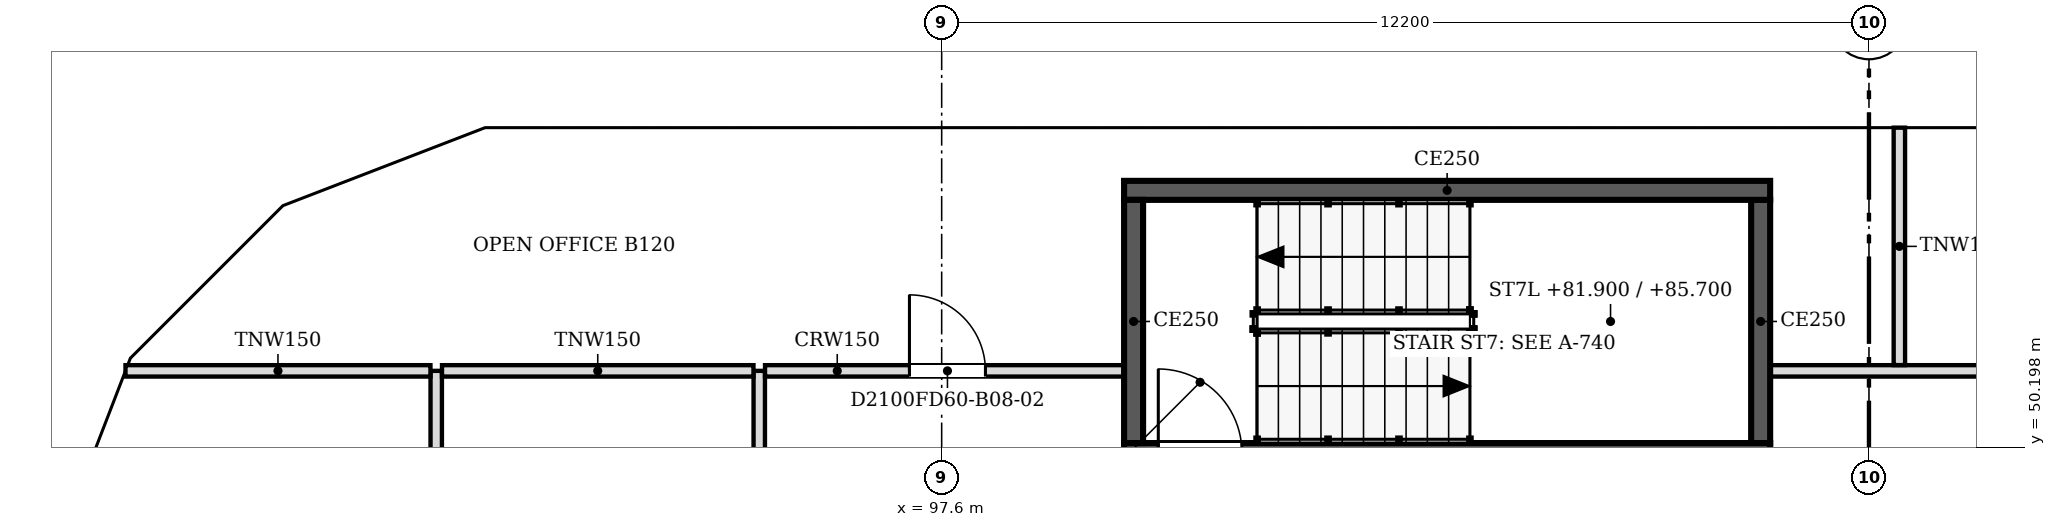
"""IFC4 building model, lengths in metres.
Left out: names, types, materials, properties, quantities, classifications, styles, units other than length and angle.
Written with IfcOpenShell. Run it as: python <this file> out.ifc"""

import sys

from ifc_helpers import new_model, si_unit, direction, frame, frame_2d, origin, place, context, subcontext, project, spatial, polyline, rectangle, outline, extrude, faceted_brep, source, transform, mapped, element, fill, save


model = new_model("IFC4")
c1 = context("Model", 3, precision=1e-05, world=origin(), true_north=direction((0.0, 1.0)))
c2 = subcontext(c1, "Body", "Model", "MODEL_VIEW")
j1 = project(units=[si_unit("LENGTHUNIT", "METRE"), si_unit("PLANEANGLEUNIT", "RADIAN")], contexts=[c1])
p1 = place(None, origin())
s1 = spatial("IfcSite", under=j1, at=p1, CompositionType="ELEMENT")
p2 = place(p1, origin())
s2 = spatial("IfcBuilding", under=s1, at=p2, CompositionType="ELEMENT")
p3 = place(p2, frame((0.0, 0.0, 80.0)))
s3 = spatial("IfcBuildingStorey", under=s2, at=p3, CompositionType="ELEMENT", Elevation=80.0)
m1 = source(origin(), c2, "Body", "Brep", [
    faceted_brep([(3.05, -0.25, 0.0), (6.1, -0.25, 3.8), (6.1, -0.25, 3.8), (3.05, -0.25, 7.6), (0.0, -0.25, 3.8), (0.0, 0.25, 3.8), (3.05, 0.25, 7.6), (6.1, 0.25, 3.8), (6.1, 0.25, 3.8), (3.05, 0.25, 0.0)], [[[0, 1, 2, 3, 4]], [[5, 6, 7, 8, 9]], [[9, 8, 1, 0]], [[7, 6, 3, 2]], [[6, 5, 4, 3]], [[5, 9, 0, 4]], [[1, 8, 7, 2]]]),
])
p4 = place(p3, frame((115.9, 54.65, -3.8), z_axis=(0.0, 0.0, 1.0), x_axis=(-1.0, 0.0, 0.0)))
e1 = element("IfcWall", 1, at=p4, inside=s3, PredefinedType="SOLIDWALL", context=c2, shape_type="MappedRepresentation", body=[
    mapped(m1, transform((0.0, 0.0, 0.0), scale=1.0)),
])
m2 = source(origin(), c2, "Body", "SweptSolid", [
    extrude(outline(polyline([(3.05, 0.399), (5.78, 3.8), (3.05, 7.201), (0.321, 3.8), (3.05, 0.399)])), frame((0.0, 0.26, 0.0), z_axis=(0.0, -1.0, 0.0), x_axis=(1.0, 0.0, 0.0)), (0.0, 0.0, 1.0), 0.52),
])
p5 = place(p4, origin())
e2 = element("IfcOpeningElement", 2, at=p5, cuts=e1, PredefinedType="OPENING", context=c2, shape_type="MappedRepresentation", body=[
    mapped(m2, transform((0.0, 0.0, 0.0), scale=1.0)),
])
m3 = source(origin(), c2, "Body", "SweptSolid", [
    extrude(outline(polyline([(3.05, 0.0), (6.1, 3.8), (3.05, 7.6), (0.0, 3.8), (3.05, 0.0)])), frame((0.0, 0.25, 0.0), z_axis=(0.0, -1.0, 0.0), x_axis=(1.0, 0.0, 0.0)), (0.0, 0.0, 1.0), 0.5),
])
p6 = place(p3, frame((109.8, 54.65, -3.8), z_axis=(0.0, 0.0, 1.0), x_axis=(-1.0, 0.0, 0.0)))
e3 = element("IfcWall", 3, at=p6, inside=s3, PredefinedType="SOLIDWALL", context=c2, shape_type="MappedRepresentation", body=[
    mapped(m3, transform((0.0, 0.0, 0.0), scale=1.0)),
])
p7 = place(p6, origin())
e4 = element("IfcOpeningElement", 4, at=p7, cuts=e3, PredefinedType="OPENING", context=c2, shape_type="MappedRepresentation", body=[
    mapped(m2, transform((0.0, 0.0, 0.0), scale=1.0)),
])
p8 = place(p3, frame((103.7, 54.65, -3.8), z_axis=(0.0, 0.0, 1.0), x_axis=(-1.0, 0.0, 0.0)))
e5 = element("IfcWall", 5, at=p8, inside=s3, PredefinedType="SOLIDWALL", context=c2, shape_type="MappedRepresentation", body=[
    mapped(m1, transform((0.0, 0.0, 0.0), scale=1.0)),
])
p9 = place(p8, origin())
e6 = element("IfcOpeningElement", 6, at=p9, cuts=e5, PredefinedType="OPENING", context=c2, shape_type="MappedRepresentation", body=[
    mapped(m2, transform((0.0, 0.0, 0.0), scale=1.0)),
])
m4 = source(origin(), c2, "Body", "Brep", [
    faceted_brep([(3.05, -0.25, 0.0), (6.053, -0.25, 3.8), (3.05, -0.25, 7.6), (0.0, -0.25, 3.8), (0.0, 0.25, 3.8), (3.05, 0.25, 7.6), (6.007, 0.25, 3.859), (6.007, 0.25, 3.741), (3.05, 0.25, 0.0), (6.053, 0.0, 3.8)], [[[0, 1, 2, 3]], [[4, 5, 6, 7, 8]], [[8, 7, 9, 1, 0]], [[6, 5, 2, 1, 9]], [[5, 4, 3, 2]], [[4, 8, 0, 3]], [[9, 7, 6]]]),
])
p10 = place(p3, frame((97.6, 54.65, -3.8), z_axis=(0.0, 0.0, 1.0), x_axis=(-1.0, 0.0, 0.0)))
e7 = element("IfcWall", 7, at=p10, inside=s3, PredefinedType="SOLIDWALL", context=c2, shape_type="MappedRepresentation", body=[
    mapped(m4, transform((0.0, 0.0, 0.0), scale=1.0)),
])
m5 = source(origin(), c2, "Body", "SweptSolid", [
    extrude(outline(polyline([(3.049, 0.401), (5.735, 3.8), (3.049, 7.199), (0.321, 3.8), (3.049, 0.401)])), frame((0.0, 0.26, 0.0), z_axis=(0.0, -1.0, 0.0), x_axis=(1.0, 0.0, 0.0)), (0.0, 0.0, 1.0), 0.52),
])
p11 = place(p10, origin())
e8 = element("IfcOpeningElement", 8, at=p11, cuts=e7, PredefinedType="OPENING", context=c2, shape_type="MappedRepresentation", body=[
    mapped(m5, transform((0.0, 0.0, 0.0), scale=1.0)),
])
m6 = source(origin(), c2, "Body", "Brep", [
    faceted_brep([(2.95, -0.25, 0.0), (3.003, -0.25, 0.068), (3.003, -0.25, 7.532), (2.95, -0.25, 7.6), (0.0, -0.25, 3.8), (0.047, 0.25, 3.86), (2.898, 0.25, 7.532), (2.898, 0.25, 0.068), (0.047, 0.25, 3.74), (2.95, 0.0, 0.0), (2.95, 0.0, 7.6), (0.0, 0.0, 3.8)], [[[0, 1, 2, 3, 4]], [[5, 6, 7, 8]], [[1, 0, 9]], [[10, 3, 2]], [[6, 5, 11, 4, 3, 10]], [[8, 7, 9, 0, 4, 11]], [[8, 11, 5]], [[1, 9, 7, 6, 10, 2]]]),
])
p12 = place(p3, frame((91.547, 54.65, -3.8), z_axis=(0.0, 0.0, 1.0), x_axis=(-0.933007896601, -0.359855894603, 0.0)))
e9 = element("IfcWall", 9, at=p12, inside=s3, PredefinedType="SOLIDWALL", context=c2, shape_type="MappedRepresentation", body=[
    mapped(m6, transform((0.0, 0.0, 0.0), scale=1.0)),
])
m7 = source(origin(), c2, "Body", "SweptSolid", [
    extrude(outline(polyline([(2.75, 6.935), (0.316, 3.8), (2.75, 0.665), (2.75, 6.935)])), frame((0.0, 0.26, 0.0), z_axis=(0.0, -1.0, 0.0), x_axis=(1.0, 0.0, 0.0)), (0.0, 0.0, 1.0), 0.52),
])
p13 = place(p12, origin())
e10 = element("IfcOpeningElement", 10, at=p13, cuts=e9, PredefinedType="OPENING", context=c2, shape_type="MappedRepresentation", body=[
    mapped(m7, transform((0.0, 0.0, 0.0), scale=1.0)),
])
m8 = source(origin(), c2, "Body", "Brep", [
    faceted_brep([(0.053, -0.25, 0.0), (2.997, -0.25, 3.8), (0.053, -0.25, 7.6), (0.0, -0.25, 7.532), (0.0, -0.25, 0.068), (0.106, 0.25, 7.532), (2.944, 0.25, 3.868), (2.944, 0.25, 3.732), (0.106, 0.25, 0.068), (2.997, 0.0, 3.8), (0.053, 0.0, 0.0), (0.053, 0.0, 7.6)], [[[0, 1, 2, 3, 4]], [[5, 6, 7, 8]], [[8, 7, 9, 1, 0, 10]], [[6, 5, 11, 2, 1, 9]], [[3, 2, 11]], [[10, 0, 4]], [[8, 10, 4, 3, 11, 5]], [[9, 7, 6]]]),
])
p14 = place(p3, frame((88.831, 53.625, -3.8), z_axis=(0.0, 0.0, 1.0), x_axis=(-0.707147509625, -0.707066050402, 0.0)))
e11 = element("IfcWall", 11, at=p14, inside=s3, PredefinedType="SOLIDWALL", context=c2, shape_type="MappedRepresentation", body=[
    mapped(m8, transform((0.0, 0.0, 0.0), scale=1.0)),
])
m9 = source(origin(), c2, "Body", "SweptSolid", [
    extrude(outline(polyline([(0.253, 0.666), (2.681, 3.8), (0.253, 6.934), (0.253, 0.666)])), frame((0.0, 0.26, 0.0), z_axis=(0.0, -1.0, 0.0), x_axis=(1.0, 0.0, 0.0)), (0.0, 0.0, 1.0), 0.52),
])
p15 = place(p14, origin())
e12 = element("IfcOpeningElement", 12, at=p15, cuts=e11, PredefinedType="OPENING", context=c2, shape_type="MappedRepresentation", body=[
    mapped(m9, transform((0.0, 0.0, 0.0), scale=1.0)),
])
m10 = source(origin(), c2, "Body", "Brep", [
    faceted_brep([(2.95, -0.25, 0.0), (2.997, -0.25, 0.059), (2.997, -0.25, 7.541), (2.95, -0.25, 7.6), (0.0, -0.25, 3.8), (0.053, 0.25, 3.868), (2.904, 0.25, 7.54), (2.904, 0.25, 0.06), (0.053, 0.25, 3.732), (2.95, 0.0, 0.0), (2.95, 0.0, 7.6), (0.0, 0.0, 3.8)], [[[0, 1, 2, 3, 4]], [[5, 6, 7, 8]], [[1, 0, 9]], [[10, 3, 2]], [[6, 5, 11, 4, 3, 10]], [[8, 7, 9, 0, 4, 11]], [[8, 11, 5]], [[1, 9, 7, 6, 10, 2]]]),
])
p16 = place(p3, frame((86.712, 51.506, -3.8), z_axis=(0.0, 0.0, 1.0), x_axis=(-0.359874094142, -0.933000876937, 0.0)))
e13 = element("IfcWall", 13, at=p16, inside=s3, PredefinedType="SOLIDWALL", context=c2, shape_type="MappedRepresentation", body=[
    mapped(m10, transform((0.0, 0.0, 0.0), scale=1.0)),
])
p17 = place(p16, origin())
e14 = element("IfcOpeningElement", 14, at=p17, cuts=e13, PredefinedType="OPENING", context=c2, shape_type="MappedRepresentation", body=[
    mapped(m7, transform((0.0, 0.0, 0.0), scale=1.0)),
])
p18 = place(p2, frame((0.0, 0.0, 83.8)))
s4 = spatial("IfcBuildingStorey", under=s2, at=p18, CompositionType="ELEMENT", Elevation=83.8)
p19 = place(p18, frame((112.85, 54.65, -3.8), z_axis=(0.0, 0.0, 1.0), x_axis=(-1.0, 0.0, 0.0)))
e15 = element("IfcWall", 15, at=p19, inside=s4, PredefinedType="SOLIDWALL", context=c2, shape_type="MappedRepresentation", body=[
    mapped(m3, transform((0.0, 0.0, 0.0), scale=1.0)),
])
p20 = place(p19, origin())
e16 = element("IfcOpeningElement", 16, at=p20, cuts=e15, PredefinedType="OPENING", context=c2, shape_type="MappedRepresentation", body=[
    mapped(m2, transform((0.0, 0.0, 0.0), scale=1.0)),
])
p21 = place(p18, frame((106.75, 54.65, -3.8), z_axis=(0.0, 0.0, 1.0), x_axis=(-1.0, 0.0, 0.0)))
e17 = element("IfcWall", 17, at=p21, inside=s4, PredefinedType="SOLIDWALL", context=c2, shape_type="MappedRepresentation", body=[
    mapped(m3, transform((0.0, 0.0, 0.0), scale=1.0)),
])
p22 = place(p21, origin())
e18 = element("IfcOpeningElement", 18, at=p22, cuts=e17, PredefinedType="OPENING", context=c2, shape_type="MappedRepresentation", body=[
    mapped(m2, transform((0.0, 0.0, 0.0), scale=1.0)),
])
p23 = place(p18, frame((100.65, 54.65, -3.8), z_axis=(0.0, 0.0, 1.0), x_axis=(-1.0, 0.0, 0.0)))
e19 = element("IfcWall", 19, at=p23, inside=s4, PredefinedType="SOLIDWALL", context=c2, shape_type="MappedRepresentation", body=[
    mapped(m1, transform((0.0, 0.0, 0.0), scale=1.0)),
])
p24 = place(p23, origin())
e20 = element("IfcOpeningElement", 20, at=p24, cuts=e19, PredefinedType="OPENING", context=c2, shape_type="MappedRepresentation", body=[
    mapped(m2, transform((0.0, 0.0, 0.0), scale=1.0)),
])
m11 = source(origin(), c2, "Body", "Brep", [
    faceted_brep([(3.003, -0.25, 0.0), (3.05, -0.25, 0.06), (3.05, -0.25, 7.54), (3.003, -0.25, 7.6), (0.0, -0.25, 3.8), (0.0, 0.25, 3.8), (2.957, 0.25, 7.541), (2.957, 0.25, 0.059), (3.003, 0.0, 0.0), (3.003, 0.0, 7.6)], [[[0, 1, 2, 3, 4]], [[5, 6, 7]], [[1, 0, 8]], [[9, 3, 2]], [[6, 5, 4, 3, 9]], [[5, 7, 8, 0, 4]], [[1, 8, 7, 6, 9, 2]]]),
])
p25 = place(p18, frame((94.55, 54.65, -3.8), z_axis=(0.0, 0.0, 1.0), x_axis=(-1.0, 0.0, 0.0)))
e21 = element("IfcWall", 21, at=p25, inside=s4, PredefinedType="SOLIDWALL", context=c2, shape_type="MappedRepresentation", body=[
    mapped(m11, transform((0.0, 0.0, 0.0), scale=1.0)),
])
m12 = source(origin(), c2, "Body", "SweptSolid", [
    extrude(outline(polyline([(2.803, 6.944), (0.319, 3.8), (2.803, 0.656), (2.803, 6.944)])), frame((0.0, 0.26, 0.0), z_axis=(0.0, -1.0, 0.0), x_axis=(1.0, 0.0, 0.0)), (0.0, 0.0, 1.0), 0.52),
])
p26 = place(p25, origin())
e22 = element("IfcOpeningElement", 22, at=p26, cuts=e21, PredefinedType="OPENING", context=c2, shape_type="MappedRepresentation", body=[
    mapped(m12, transform((0.0, 0.0, 0.0), scale=1.0)),
])
m13 = source(origin(), c2, "Body", "Brep", [
    faceted_brep([(0.047, -0.25, 0.0), (2.997, -0.25, 3.8), (0.047, -0.25, 7.6), (0.0, -0.25, 7.541), (0.0, -0.25, 0.059), (0.093, 0.25, 7.54), (2.944, 0.25, 3.868), (2.944, 0.25, 3.732), (0.093, 0.25, 0.06), (2.997, 0.0, 3.8), (0.047, 0.0, 0.0), (0.047, 0.0, 7.6)], [[[0, 1, 2, 3, 4]], [[5, 6, 7, 8]], [[8, 7, 9, 1, 0, 10]], [[6, 5, 11, 2, 1, 9]], [[3, 2, 11]], [[10, 0, 4]], [[8, 10, 4, 3, 11, 5]], [[9, 7, 6]]]),
])
p27 = place(p18, frame((91.59, 54.667, -3.8), z_axis=(0.0, 0.0, 1.0), x_axis=(-0.933000876937, -0.359874094142, 0.0)))
e23 = element("IfcWall", 23, at=p27, inside=s4, PredefinedType="SOLIDWALL", context=c2, shape_type="MappedRepresentation", body=[
    mapped(m13, transform((0.0, 0.0, 0.0), scale=1.0)),
])
m14 = source(origin(), c2, "Body", "SweptSolid", [
    extrude(outline(polyline([(0.247, 0.665), (2.681, 3.8), (0.247, 6.935), (0.247, 0.665)])), frame((0.0, 0.26, 0.0), z_axis=(0.0, -1.0, 0.0), x_axis=(1.0, 0.0, 0.0)), (0.0, 0.0, 1.0), 0.52),
])
p28 = place(p27, origin())
e24 = element("IfcOpeningElement", 24, at=p28, cuts=e23, PredefinedType="OPENING", context=c2, shape_type="MappedRepresentation", body=[
    mapped(m14, transform((0.0, 0.0, 0.0), scale=1.0)),
])
m15 = source(origin(), c2, "Body", "Brep", [
    faceted_brep([(2.944, -0.25, 0.0), (2.997, -0.25, 0.068), (2.997, -0.25, 7.532), (2.944, -0.25, 7.6), (0.0, -0.25, 3.8), (0.053, 0.25, 3.868), (2.891, 0.25, 7.532), (2.891, 0.25, 0.068), (0.053, 0.25, 3.732), (2.944, 0.0, 0.0), (2.944, 0.0, 7.6), (0.0, 0.0, 3.8)], [[[0, 1, 2, 3, 4]], [[5, 6, 7, 8]], [[1, 0, 9]], [[10, 3, 2]], [[6, 5, 11, 4, 3, 10]], [[8, 7, 9, 0, 4, 11]], [[8, 11, 5]], [[1, 9, 7, 6, 10, 2]]]),
])
p29 = place(p18, frame((88.794, 53.588, -3.8), z_axis=(0.0, 0.0, 1.0), x_axis=(-0.707066050402, -0.707147509625, 0.0)))
e25 = element("IfcWall", 25, at=p29, inside=s4, PredefinedType="SOLIDWALL", context=c2, shape_type="MappedRepresentation", body=[
    mapped(m15, transform((0.0, 0.0, 0.0), scale=1.0)),
])
m16 = source(origin(), c2, "Body", "SweptSolid", [
    extrude(outline(polyline([(2.744, 6.934), (0.316, 3.8), (2.744, 0.666), (2.744, 6.934)])), frame((0.0, 0.26, 0.0), z_axis=(0.0, -1.0, 0.0), x_axis=(1.0, 0.0, 0.0)), (0.0, 0.0, 1.0), 0.52),
])
p30 = place(p29, origin())
e26 = element("IfcOpeningElement", 26, at=p30, cuts=e25, PredefinedType="OPENING", context=c2, shape_type="MappedRepresentation", body=[
    mapped(m16, transform((0.0, 0.0, 0.0), scale=1.0)),
])
m17 = source(origin(), c2, "Body", "Brep", [
    faceted_brep([(0.053, -0.25, 0.0), (3.003, -0.25, 3.8), (0.053, -0.25, 7.6), (0.0, -0.25, 7.532), (0.0, -0.25, 0.068), (0.106, 0.25, 7.532), (2.957, 0.25, 3.86), (2.957, 0.25, 3.74), (0.106, 0.25, 0.068), (3.003, 0.0, 3.8), (0.053, 0.0, 0.0), (0.053, 0.0, 7.6)], [[[0, 1, 2, 3, 4]], [[5, 6, 7, 8]], [[8, 7, 9, 1, 0, 10]], [[6, 5, 11, 2, 1, 9]], [[3, 2, 11]], [[10, 0, 4]], [[8, 10, 4, 3, 11, 5]], [[9, 7, 6]]]),
])
p31 = place(p18, frame((86.731, 51.556, -3.8), z_axis=(0.0, 0.0, 1.0), x_axis=(-0.359855894603, -0.933007896601, 0.0)))
e27 = element("IfcWall", 27, at=p31, inside=s4, PredefinedType="SOLIDWALL", context=c2, shape_type="MappedRepresentation", body=[
    mapped(m17, transform((0.0, 0.0, 0.0), scale=1.0)),
])
m18 = source(origin(), c2, "Body", "SweptSolid", [
    extrude(outline(polyline([(0.253, 0.665), (2.687, 3.8), (0.253, 6.935), (0.253, 0.665)])), frame((0.0, 0.26, 0.0), z_axis=(0.0, -1.0, 0.0), x_axis=(1.0, 0.0, 0.0)), (0.0, 0.0, 1.0), 0.52),
])
p32 = place(p31, origin())
e28 = element("IfcOpeningElement", 28, at=p32, cuts=e27, PredefinedType="OPENING", context=c2, shape_type="MappedRepresentation", body=[
    mapped(m18, transform((0.0, 0.0, 0.0), scale=1.0)),
])
p33 = place(p3, frame((108.5, 50.125, 0.0), z_axis=(0.0, 0.0, 1.0), x_axis=(-1.0, 0.0, 0.0)))
e29 = element("IfcWall", 29, at=p33, inside=s3, PredefinedType="SOLIDWALL", context=c2, shape_type="SweptSolid", body=[
    extrude(rectangle(XDim=8.5, YDim=0.25, at=frame_2d((4.25, 0.0))), origin(), (0.0, 0.0, 1.0), 3.8),
])
m19 = source(origin(), c2, "Body", "SweptSolid", [
    extrude(rectangle(XDim=1.1, YDim=2.1, at=frame_2d((0.55, 1.05))), frame((0.0, 0.135, 0.0), z_axis=(0.0, -1.0, 0.0), x_axis=(1.0, 0.0, 0.0)), (0.0, 0.0, 1.0), 0.27),
])
p34 = place(p33, frame((6.95, 0.0, 0.0)))
e30 = element("IfcOpeningElement", 30, at=p34, cuts=e29, PredefinedType="OPENING", context=c2, shape_type="MappedRepresentation", body=[
    mapped(m19, transform((0.0, 0.0, 0.0), scale=1.0)),
])
p35 = place(p3, frame((100.125, 50.25, 0.0), z_axis=(0.0, 0.0, 1.0), x_axis=(0.0, 1.0, 0.0)))
e31 = element("IfcWall", 31, at=p35, inside=s3, PredefinedType="SOLIDWALL", context=c2, shape_type="SweptSolid", body=[
    extrude(rectangle(XDim=3.2, YDim=0.25, at=frame_2d((1.6, 0.0))), origin(), (0.0, 0.0, 1.0), 3.8),
])
p36 = place(p3, frame((100.0, 53.575, 0.0), z_axis=(0.0, 0.0, 1.0), x_axis=(1.0, 0.0, 0.0)))
e32 = element("IfcWall", 32, at=p36, inside=s3, PredefinedType="SOLIDWALL", context=c2, shape_type="SweptSolid", body=[
    extrude(rectangle(XDim=8.5, YDim=0.25, at=frame_2d((4.25, 0.0))), origin(), (0.0, 0.0, 1.0), 3.8),
])
p37 = place(p3, frame((108.375, 53.45, 0.0), z_axis=(0.0, 0.0, 1.0), x_axis=(0.0, -1.0, 0.0)))
e33 = element("IfcWall", 33, at=p37, inside=s3, PredefinedType="SOLIDWALL", context=c2, shape_type="SweptSolid", body=[
    extrude(rectangle(XDim=3.2, YDim=0.25, at=frame_2d((1.6, 0.0))), origin(), (0.0, 0.0, 1.0), 3.8),
])
p38 = place(p3, frame((95.2, 36.6, 0.0), z_axis=(0.0, 0.0, 1.0), x_axis=(0.0, 1.0, 0.0)))
e34 = element("IfcWall", 34, at=p38, inside=s3, PredefinedType="PARTITIONING", context=c2, shape_type="SweptSolid", body=[
    extrude(rectangle(XDim=14.6, YDim=0.15, at=frame_2d((7.3, 0.0))), origin(), (0.0, 0.0, 1.0), 3.067),
])
m20 = source(origin(), c2, "Body", "SweptSolid", [
    extrude(rectangle(XDim=1.0, YDim=2.1, at=frame_2d((0.5, 1.05))), frame((0.0, 0.085, 0.0), z_axis=(0.0, -1.0, 0.0), x_axis=(1.0, 0.0, 0.0)), (0.0, 0.0, 1.0), 0.17),
])
p39 = place(p38, frame((9.8, 0.0, 0.0)))
e35 = element("IfcOpeningElement", 35, at=p39, cuts=e34, PredefinedType="OPENING", context=c2, shape_type="MappedRepresentation", body=[
    mapped(m20, transform((0.0, 0.0, 0.0), scale=1.0)),
])
p40 = place(p38, frame((2.5, 0.0, 0.0)))
e36 = element("IfcOpeningElement", 36, at=p40, cuts=e34, PredefinedType="OPENING", context=c2, shape_type="MappedRepresentation", body=[
    mapped(m20, transform((0.0, 0.0, 0.0), scale=1.0)),
])
p41 = place(p3, frame((90.95, 36.676, 0.0), z_axis=(0.0, 0.0, 1.0), x_axis=(0.0, 1.0, 0.0)))
e37 = element("IfcWall", 37, at=p41, inside=s3, PredefinedType="PARTITIONING", context=c2, shape_type="SweptSolid", body=[
    extrude(rectangle(XDim=14.524, YDim=0.15, at=frame_2d((7.262, 0.0))), origin(), (0.0, 0.0, 1.0), 3.067),
])
m21 = source(origin(), c2, "Body", "SweptSolid", [
    extrude(rectangle(XDim=0.9, YDim=2.1, at=frame_2d((0.45, 1.05))), frame((0.0, 0.085, 0.0), z_axis=(0.0, -1.0, 0.0), x_axis=(1.0, 0.0, 0.0)), (0.0, 0.0, 1.0), 0.17),
])
p42 = place(p41, frame((7.525, 0.0, 0.0)))
e38 = element("IfcOpeningElement", 38, at=p42, cuts=e37, PredefinedType="OPENING", context=c2, shape_type="MappedRepresentation", body=[
    mapped(m21, transform((0.0, 0.0, 0.0), scale=1.0)),
])
p43 = place(p41, frame((11.879, 0.0, 0.0)))
e39 = element("IfcOpeningElement", 39, at=p43, cuts=e37, PredefinedType="OPENING", context=c2, shape_type="MappedRepresentation", body=[
    mapped(m21, transform((0.0, 0.0, 0.0), scale=1.0)),
])
p44 = place(p41, frame((2.5, 0.0, 0.0)))
e40 = element("IfcOpeningElement", 40, at=p44, cuts=e37, PredefinedType="OPENING", context=c2, shape_type="MappedRepresentation", body=[
    mapped(m21, transform((0.0, 0.0, 0.0), scale=1.0)),
])
p45 = place(p3, frame((86.862, 51.2, 0.0), z_axis=(0.0, 0.0, 1.0), x_axis=(1.0, 0.0, 0.0)))
e41 = element("IfcWall", 41, at=p45, inside=s3, PredefinedType="PARTITIONING", context=c2, shape_type="SweptSolid", body=[
    extrude(rectangle(XDim=4.012, YDim=0.15, at=frame_2d((2.006, 0.0))), origin(), (0.0, 0.0, 1.0), 3.067),
])
p46 = place(p3, frame((91.026, 51.2, 0.0), z_axis=(0.0, 0.0, 1.0), x_axis=(1.0, 0.0, 0.0)))
e42 = element("IfcWall", 42, at=p46, inside=s3, PredefinedType="PARTITIONING", context=c2, shape_type="SweptSolid", body=[
    extrude(rectangle(XDim=4.098, YDim=0.15, at=frame_2d((2.049, 0.0))), origin(), (0.0, 0.0, 1.0), 3.067),
])
p47 = place(p3, frame((95.276, 51.2, 0.0), z_axis=(0.0, 0.0, 1.0), x_axis=(1.0, 0.0, 0.0)))
e43 = element("IfcWall", 43, at=p47, inside=s3, PredefinedType="PARTITIONING", context=c2, shape_type="SweptSolid", body=[
    extrude(rectangle(XDim=4.724, YDim=0.15, at=frame_2d((2.362, 0.0))), origin(), (0.0, 0.0, 1.0), 3.067),
])
p48 = place(p47, frame((1.9, 0.0, 0.0)))
e44 = element("IfcOpeningElement", 44, at=p48, cuts=e43, PredefinedType="OPENING", context=c2, shape_type="MappedRepresentation", body=[
    mapped(m20, transform((0.0, 0.0, 0.0), scale=1.0)),
])
p49 = place(p3, frame((108.5, 51.2, 0.0), z_axis=(0.0, 0.0, 1.0), x_axis=(1.0, 0.0, 0.0)))
e45 = element("IfcWall", 45, at=p49, inside=s3, PredefinedType="PARTITIONING", context=c2, shape_type="SweptSolid", body=[
    extrude(rectangle(XDim=15.9, YDim=0.15, at=frame_2d((7.95, 0.0))), origin(), (0.0, 0.0, 1.0), 3.067),
])
p50 = place(p49, frame((8.3, 0.0, 0.0)))
e46 = element("IfcOpeningElement", 46, at=p50, cuts=e45, PredefinedType="OPENING", context=c2, shape_type="MappedRepresentation", body=[
    mapped(m21, transform((0.0, 0.0, 0.0), scale=1.0)),
])
p51 = place(p3, frame((110.2, 51.276, 0.0), z_axis=(0.0, 0.0, 1.0), x_axis=(0.0, 1.0, 0.0)))
e47 = element("IfcWall", 47, at=p51, inside=s3, PredefinedType="PARTITIONING", context=c2, shape_type="SweptSolid", body=[
    extrude(rectangle(XDim=3.124, YDim=0.15, at=frame_2d((1.562, 0.0))), origin(), (0.0, 0.0, 1.0), 3.067),
])
m22 = source(origin(), c2, "Body", "SweptSolid", [
    extrude(rectangle(XDim=1.0, YDim=2.1, at=frame_2d((0.5, 1.05))), frame((0.0, 0.025, 0.0), z_axis=(0.0, -1.0, 0.0), x_axis=(1.0, 0.0, 0.0)), (0.0, 0.0, 1.0), 0.05),
])
p52 = place(p48, origin())
e48 = element("IfcDoor", 48, at=p52, inside=s3, OperationType="SINGLE_SWING_LEFT", PredefinedType="DOOR", context=c2, shape_type="MappedRepresentation", body=[
    mapped(m22, transform((0.0, 0.0, 0.0), scale=1.0)),
])
fill(e44, e48)
save(model, sys.argv[1])
